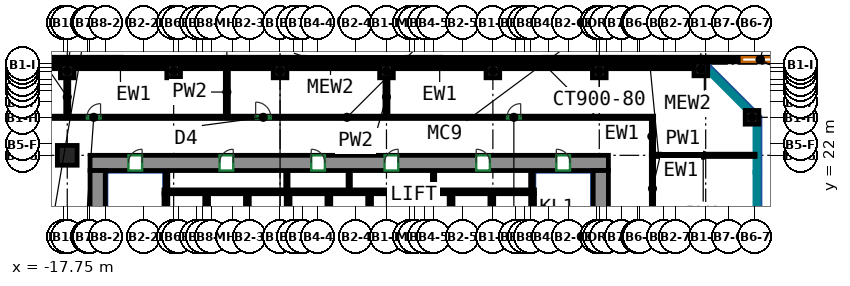
"""IFC4 building model, lengths in metres.
Left out: names, types, materials, properties, quantities, classifications, styles, units other than length and angle.
Written with IfcOpenShell. Run it as: python <this file> out.ifc"""

import sys

from ifc_helpers import new_model, si_unit, direction, frame, frame_2d, origin, origin_2d, place, context, subcontext, project, spatial, rectangle, extrude, source, transform, mapped, element, fill, save


model = new_model("IFC4")
c1 = context("Model", 3, precision=1e-05, world=origin(), true_north=direction((0.0, 1.0)))
c2 = subcontext(c1, "Body", "Model", "MODEL_VIEW")
j1 = project(units=[si_unit("LENGTHUNIT", "METRE"), si_unit("PLANEANGLEUNIT", "RADIAN")], contexts=[c1])
p1 = place(None, origin())
s1 = spatial("IfcSite", under=j1, at=p1, CompositionType="ELEMENT")
p2 = place(p1, origin())
s2 = spatial("IfcBuilding", under=s1, at=p2, CompositionType="ELEMENT")
p3 = place(p2, origin())
s3 = spatial("IfcBuildingStorey", under=s2, at=p3, CompositionType="ELEMENT", Elevation=0.0)
m1 = source(origin(), c2, "Body", "SweptSolid", [
    extrude(rectangle(XDim=1.3, YDim=1.3, at=origin_2d()), origin(), (0.0, 0.0, 1.0), 8.6),
])
p4 = place(p3, frame((-17.5, 22.0, 0.0), z_axis=(0.0, 0.0, 1.0), x_axis=(1.0, 0.0, 0.0)))
e1 = element("IfcColumn", 1, at=p4, inside=s3, PredefinedType="COLUMN", context=c2, shape_type="MappedRepresentation", body=[
    mapped(m1, transform((0.0, 0.0, 0.0))),
])
m2 = source(origin(), c2, "Body", "SweptSolid", [
    extrude(rectangle(XDim=0.9, YDim=0.9, at=origin_2d()), origin(), (0.0, 0.0, 1.0), 8.6),
])
for number, where, z_axis, x_axis in (
    (2, (-17.5, 27.55, 0.0), (0.0, 0.0, 1.0), (1.0, 0.0, 0.0)),
    (3, (-10.5, 27.55, 0.0), (0.0, 0.0, 1.0), (1.0, 0.0, 0.0)),
    (4, (-3.5, 27.55, 0.0), (0.0, 0.0, 1.0), (1.0, 0.0, 0.0)),
    (5, (3.5, 27.55, 0.0), (0.0, 0.0, 1.0), (1.0, 0.0, 0.0)),
    (6, (10.5, 27.55, 0.0), (0.0, 0.0, 1.0), (1.0, 0.0, 0.0)),
    (7, (17.5, 27.55, 0.0), (0.0, 0.0, 1.0), (1.0, 0.0, 0.0)),
    (8, (24.182, 27.682, 0.0), (0.0, 0.0, 1.0), (1.0, 0.0, 0.0)),
    (9, (27.55, 24.5, 0.0), (0.0, 0.0, 1.0), (1.0, 0.0, 0.0)),
):
    element("IfcColumn", number, at=place(p3, frame(where, z_axis=z_axis, x_axis=x_axis)), inside=s3, PredefinedType="COLUMN", context=c2, shape_type="MappedRepresentation", body=[
        mapped(m2, transform((0.0, 0.0, 0.0))),
    ])
m3 = source(origin(), c2, "Body", "SweptSolid", [
    extrude(rectangle(XDim=34.1, YDim=1.0, at=frame_2d((17.05, 0.0))), origin(), (0.0, 0.0, 1.0), 8.6),
])
p5 = place(p3, frame((-16.0, 21.5, 0.0), z_axis=(0.0, 0.0, 1.0), x_axis=(1.0, 0.0, 0.0)))
e10 = element("IfcWall", 10, at=p5, inside=s3, PredefinedType="SHEAR", context=c2, shape_type="MappedRepresentation", body=[
    mapped(m3, transform((0.0, 0.0, 0.0))),
])
p6 = place(p5, frame((8.52, 0.0, 0.0)))
e11 = element("IfcOpeningElement", 11, at=p6, cuts=e10, PredefinedType="OPENING", context=c2, shape_type="SweptSolid", body=[
    extrude(rectangle(XDim=0.9, YDim=2.1, at=frame_2d((0.45, 1.05))), frame((0.0, 0.51, 0.0), z_axis=(0.0, -1.0, 0.0), x_axis=(1.0, 0.0, 0.0)), (0.0, 0.0, 1.0), 1.02),
])
p7 = place(p5, frame((14.55, 0.0, 0.0)))
e12 = element("IfcOpeningElement", 12, at=p7, cuts=e10, PredefinedType="OPENING", context=c2, shape_type="SweptSolid", body=[
    extrude(rectangle(XDim=0.9, YDim=2.1, at=frame_2d((0.45, 1.05))), frame((0.0, 0.51, 0.0), z_axis=(0.0, -1.0, 0.0), x_axis=(1.0, 0.0, 0.0)), (0.0, 0.0, 1.0), 1.02),
])
p8 = place(p5, frame((19.374, 0.0, 0.0)))
e13 = element("IfcOpeningElement", 13, at=p8, cuts=e10, PredefinedType="OPENING", context=c2, shape_type="SweptSolid", body=[
    extrude(rectangle(XDim=0.9, YDim=2.1, at=frame_2d((0.45, 1.05))), frame((0.0, 0.51, 0.0), z_axis=(0.0, -1.0, 0.0), x_axis=(1.0, 0.0, 0.0)), (0.0, 0.0, 1.0), 1.02),
])
p9 = place(p5, frame((25.404, 0.0, 0.0)))
e14 = element("IfcOpeningElement", 14, at=p9, cuts=e10, PredefinedType="OPENING", context=c2, shape_type="SweptSolid", body=[
    extrude(rectangle(XDim=0.9, YDim=2.1, at=frame_2d((0.45, 1.05))), frame((0.0, 0.51, 0.0), z_axis=(0.0, -1.0, 0.0), x_axis=(1.0, 0.0, 0.0)), (0.0, 0.0, 1.0), 1.02),
])
p10 = place(p5, frame((2.525, 0.0, 0.0)))
e15 = element("IfcOpeningElement", 15, at=p10, cuts=e10, PredefinedType="OPENING", context=c2, shape_type="SweptSolid", body=[
    extrude(rectangle(XDim=0.9, YDim=2.1, at=frame_2d((0.45, 1.05))), frame((0.0, 0.51, 0.0), z_axis=(0.0, -1.0, 0.0), x_axis=(1.0, 0.0, 0.0)), (0.0, 0.0, 1.0), 1.02),
])
p11 = place(p5, frame((30.675, 0.0, 0.0)))
e16 = element("IfcOpeningElement", 16, at=p11, cuts=e10, PredefinedType="OPENING", context=c2, shape_type="SweptSolid", body=[
    extrude(rectangle(XDim=0.9, YDim=2.1, at=frame_2d((0.45, 1.05))), frame((0.0, 0.51, 0.0), z_axis=(0.0, -1.0, 0.0), x_axis=(1.0, 0.0, 0.0)), (0.0, 0.0, 1.0), 1.02),
])
m4 = source(origin(), c2, "Body", "SweptSolid", [
    extrude(rectangle(XDim=12.0, YDim=1.0, at=frame_2d((6.0, 0.0))), origin(), (0.0, 0.0, 1.0), 8.6),
])
for number, where, z_axis, x_axis in (
    (17, (-15.5, 9.0, 0.0), (0.0, 0.0, 1.0), (0.0, 1.0, 0.0)),
    (18, (17.6, 9.0, 0.0), (0.0, 0.0, 1.0), (0.0, 1.0, 0.0)),
):
    element("IfcWall", number, at=place(p3, frame(where, z_axis=z_axis, x_axis=x_axis)), inside=s3, PredefinedType="SHEAR", context=c2, shape_type="MappedRepresentation", body=[
        mapped(m4, transform((0.0, 0.0, 0.0))),
    ])
m5 = source(origin(), c2, "Body", "SweptSolid", [
    extrude(rectangle(XDim=5.782, YDim=0.3, at=frame_2d((2.891, 0.0))), origin(), (0.0, 0.0, 1.0), 8.6),
])
p12 = place(p3, frame((23.732, 27.85, 0.0), z_axis=(0.0, 0.0, 1.0), x_axis=(-1.0, 0.0, 0.0)))
e19 = element("IfcWall", 19, at=p12, inside=s3, PredefinedType="SOLIDWALL", context=c2, shape_type="MappedRepresentation", body=[
    mapped(m5, transform((0.0, 0.0, 0.0))),
])
m6 = source(origin(), c2, "Body", "SweptSolid", [
    extrude(rectangle(XDim=6.1, YDim=0.3, at=frame_2d((3.05, 0.0))), origin(), (0.0, 0.0, 1.0), 8.6),
])
for number, where, z_axis, x_axis in (
    (20, (17.05, 27.85, 0.0), (0.0, 0.0, 1.0), (-1.0, 0.0, 0.0)),
    (21, (10.05, 27.85, 0.0), (0.0, 0.0, 1.0), (-1.0, 0.0, 0.0)),
    (22, (3.05, 27.85, 0.0), (0.0, 0.0, 1.0), (-1.0, 0.0, 0.0)),
    (23, (-3.95, 27.85, 0.0), (0.0, 0.0, 1.0), (-1.0, 0.0, 0.0)),
    (24, (-10.95, 27.85, 0.0), (0.0, 0.0, 1.0), (-1.0, 0.0, 0.0)),
    (25, (-17.95, 27.85, 0.0), (0.0, 0.0, 1.0), (-1.0, 0.0, 0.0)),
):
    element("IfcWall", number, at=place(p3, frame(where, z_axis=z_axis, x_axis=x_axis)), inside=s3, PredefinedType="SOLIDWALL", context=c2, shape_type="MappedRepresentation", body=[
        mapped(m6, transform((0.0, 0.0, 0.0))),
    ])
m7 = source(origin(), c2, "Body", "SweptSolid", [
    extrude(rectangle(XDim=30.926, YDim=0.3, at=frame_2d((15.463, 0.0))), origin(), (0.0, 0.0, 1.0), 8.6),
])
p13 = place(p3, frame((55.55, 28.3, 0.0), z_axis=(0.0, 0.0, 1.0), x_axis=(-1.0, 0.0, 0.0)))
e26 = element("IfcWall", 26, at=p13, inside=s3, PredefinedType="SOLIDWALL", context=c2, shape_type="MappedRepresentation", body=[
    mapped(m7, transform((0.0, 0.0, 0.0))),
])
p14 = place(p13, frame((18.8, 0.0, 0.0)))
e27 = element("IfcOpeningElement", 27, at=p14, cuts=e26, PredefinedType="OPENING", context=c2, shape_type="SweptSolid", body=[
    extrude(rectangle(XDim=1.5, YDim=2.4, at=frame_2d((0.75, 1.2))), frame((0.0, 0.16, 0.0), z_axis=(0.0, -1.0, 0.0), x_axis=(1.0, 0.0, 0.0)), (0.0, 0.0, 1.0), 0.32),
])
p15 = place(p13, frame((4.8, 0.0, 0.0)))
e28 = element("IfcOpeningElement", 28, at=p15, cuts=e26, PredefinedType="OPENING", context=c2, shape_type="SweptSolid", body=[
    extrude(rectangle(XDim=1.5, YDim=2.4, at=frame_2d((0.75, 1.2))), frame((0.0, 0.16, 0.0), z_axis=(0.0, -1.0, 0.0), x_axis=(1.0, 0.0, 0.0)), (0.0, 0.0, 1.0), 0.32),
])
p16 = place(p13, frame((11.8, 0.0, 0.0)))
e29 = element("IfcOpeningElement", 29, at=p16, cuts=e26, PredefinedType="OPENING", context=c2, shape_type="SweptSolid", body=[
    extrude(rectangle(XDim=1.5, YDim=2.4, at=frame_2d((0.75, 1.2))), frame((0.0, 0.16, 0.0), z_axis=(0.0, -1.0, 0.0), x_axis=(1.0, 0.0, 0.0)), (0.0, 0.0, 1.0), 0.32),
])
p17 = place(p13, frame((14.263, 0.0, 0.6)))
e30 = element("IfcOpeningElement", 30, at=p17, cuts=e26, PredefinedType="OPENING", context=c2, shape_type="SweptSolid", body=[
    extrude(rectangle(XDim=2.4, YDim=3.0, at=frame_2d((1.2, 1.5))), frame((0.0, 0.16, 0.0), z_axis=(0.0, -1.0, 0.0), x_axis=(1.0, 0.0, 0.0)), (0.0, 0.0, 1.0), 0.32),
])
p18 = place(p13, frame((14.263, 0.0, 5.0)))
e31 = element("IfcOpeningElement", 31, at=p18, cuts=e26, PredefinedType="OPENING", context=c2, shape_type="SweptSolid", body=[
    extrude(rectangle(XDim=2.4, YDim=2.0, at=frame_2d((1.2, 1.0))), frame((0.0, 0.16, 0.0), z_axis=(0.0, -1.0, 0.0), x_axis=(1.0, 0.0, 0.0)), (0.0, 0.0, 1.0), 0.32),
])
p19 = place(p13, frame((22.263, 0.0, 0.6)))
e32 = element("IfcOpeningElement", 32, at=p19, cuts=e26, PredefinedType="OPENING", context=c2, shape_type="SweptSolid", body=[
    extrude(rectangle(XDim=2.4, YDim=3.0, at=frame_2d((1.2, 1.5))), frame((0.0, 0.16, 0.0), z_axis=(0.0, -1.0, 0.0), x_axis=(1.0, 0.0, 0.0)), (0.0, 0.0, 1.0), 0.32),
])
p20 = place(p13, frame((22.263, 0.0, 5.0)))
e33 = element("IfcOpeningElement", 33, at=p20, cuts=e26, PredefinedType="OPENING", context=c2, shape_type="SweptSolid", body=[
    extrude(rectangle(XDim=2.4, YDim=2.0, at=frame_2d((1.2, 1.0))), frame((0.0, 0.16, 0.0), z_axis=(0.0, -1.0, 0.0), x_axis=(1.0, 0.0, 0.0)), (0.0, 0.0, 1.0), 0.32),
])
p21 = place(p13, frame((26.263, 0.0, 0.6)))
e34 = element("IfcOpeningElement", 34, at=p21, cuts=e26, PredefinedType="OPENING", context=c2, shape_type="SweptSolid", body=[
    extrude(rectangle(XDim=2.4, YDim=3.0, at=frame_2d((1.2, 1.5))), frame((0.0, 0.16, 0.0), z_axis=(0.0, -1.0, 0.0), x_axis=(1.0, 0.0, 0.0)), (0.0, 0.0, 1.0), 0.32),
])
p22 = place(p13, frame((26.263, 0.0, 5.0)))
e35 = element("IfcOpeningElement", 35, at=p22, cuts=e26, PredefinedType="OPENING", context=c2, shape_type="SweptSolid", body=[
    extrude(rectangle(XDim=2.4, YDim=2.0, at=frame_2d((1.2, 1.0))), frame((0.0, 0.16, 0.0), z_axis=(0.0, -1.0, 0.0), x_axis=(1.0, 0.0, 0.0)), (0.0, 0.0, 1.0), 0.32),
])
m8 = source(origin(), c2, "Body", "SweptSolid", [
    extrude(rectangle(XDim=0.424, YDim=0.3, at=frame_2d((0.212, 0.0))), origin(), (0.0, 0.0, 1.0), 8.6),
])
p23 = place(p3, frame((24.624, 28.3, 0.0), z_axis=(0.0, 0.0, 1.0), x_axis=(-1.0, 0.0, 0.0)))
e36 = element("IfcWall", 36, at=p23, inside=s3, PredefinedType="SOLIDWALL", context=c2, shape_type="MappedRepresentation", body=[
    mapped(m8, transform((0.0, 0.0, 0.0))),
])
m9 = source(origin(), c2, "Body", "SweptSolid", [
    extrude(rectangle(XDim=48.762, YDim=0.3, at=frame_2d((24.381, 0.0))), origin(), (0.0, 0.0, 1.0), 8.6),
])
p24 = place(p3, frame((24.2, 28.3, 0.0), z_axis=(0.0, 0.0, 1.0), x_axis=(-1.0, 0.0, 0.0)))
e37 = element("IfcWall", 37, at=p24, inside=s3, PredefinedType="SOLIDWALL", context=c2, shape_type="MappedRepresentation", body=[
    mapped(m9, transform((0.0, 0.0, 0.0))),
])
m10 = source(origin(), c2, "Body", "SweptSolid", [
    extrude(rectangle(XDim=24.37, YDim=0.25, at=frame_2d((12.185, 0.0))), origin(), (0.0, 0.0, 1.0), 8.6),
])
p25 = place(p3, frame((-11.135, 19.6, 0.0), z_axis=(0.0, 0.0, 1.0), x_axis=(1.0, 0.0, 0.0)))
e38 = element("IfcWall", 38, at=p25, inside=s3, PredefinedType="PARTITIONING", context=c2, shape_type="MappedRepresentation", body=[
    mapped(m10, transform((0.0, 0.0, 0.0))),
])
m11 = source(origin(), c2, "Body", "SweptSolid", [
    extrude(rectangle(XDim=3.275, YDim=0.165, at=frame_2d((1.638, 0.0))), origin(), (0.0, 0.0, 1.0), 8.6),
])
p26 = place(p3, frame((13.067, 16.2, 0.0), z_axis=(0.0, 0.0, 1.0), x_axis=(0.0, 1.0, 0.0)))
e39 = element("IfcWall", 39, at=p26, inside=s3, PredefinedType="PARTITIONING", context=c2, shape_type="MappedRepresentation", body=[
    mapped(m11, transform((0.0, 0.0, 0.0))),
])
m12 = source(origin(), c2, "Body", "SweptSolid", [
    extrude(rectangle(XDim=1.275, YDim=0.165, at=frame_2d((0.637, 0.0))), origin(), (0.0, 0.0, 1.0), 8.6),
])
p27 = place(p3, frame((13.067, 19.725, 0.0), z_axis=(0.0, 0.0, 1.0), x_axis=(0.0, 1.0, 0.0)))
e40 = element("IfcWall", 40, at=p27, inside=s3, PredefinedType="PARTITIONING", context=c2, shape_type="MappedRepresentation", body=[
    mapped(m12, transform((0.0, 0.0, 0.0))),
])
p28 = place(p3, frame((-10.968, 16.2, 0.0), z_axis=(0.0, 0.0, 1.0), x_axis=(0.0, 1.0, 0.0)))
e41 = element("IfcWall", 41, at=p28, inside=s3, PredefinedType="PARTITIONING", context=c2, shape_type="MappedRepresentation", body=[
    mapped(m11, transform((0.0, 0.0, 0.0))),
])
p29 = place(p3, frame((-10.968, 19.725, 0.0), z_axis=(0.0, 0.0, 1.0), x_axis=(0.0, 1.0, 0.0)))
e42 = element("IfcWall", 42, at=p29, inside=s3, PredefinedType="PARTITIONING", context=c2, shape_type="MappedRepresentation", body=[
    mapped(m12, transform((0.0, 0.0, 0.0))),
])
m13 = source(origin(), c2, "Body", "SweptSolid", [
    extrude(rectangle(XDim=3.275, YDim=0.25, at=frame_2d((1.638, 0.0))), origin(), (0.0, 0.0, 1.0), 8.6),
])
p30 = place(p3, frame((10.43, 16.2, 0.0), z_axis=(0.0, 0.0, 1.0), x_axis=(0.0, 1.0, 0.0)))
e43 = element("IfcWall", 43, at=p30, inside=s3, PredefinedType="PARTITIONING", context=c2, shape_type="MappedRepresentation", body=[
    mapped(m13, transform((0.0, 0.0, 0.0))),
])
m14 = source(origin(), c2, "Body", "SweptSolid", [
    extrude(rectangle(XDim=2.725, YDim=0.085, at=frame_2d((1.363, 0.0))), origin(), (0.0, 0.0, 1.0), 8.6),
])
p31 = place(p3, frame((13.192, 16.75, 0.0), z_axis=(0.0, 0.0, 1.0), x_axis=(0.0, 1.0, 0.0)))
e44 = element("IfcWall", 44, at=p31, inside=s3, PredefinedType="PARTITIONING", context=c2, shape_type="MappedRepresentation", body=[
    mapped(m14, transform((0.0, 0.0, 0.0))),
])
for number, where, z_axis, x_axis in (
    (45, (2.39, 16.2, 0.0), (0.0, 0.0, 1.0), (0.0, 1.0, 0.0)),
    (46, (5.07, 16.2, 0.0), (0.0, 0.0, 1.0), (0.0, 1.0, 0.0)),
    (47, (7.75, 16.2, 0.0), (0.0, 0.0, 1.0), (0.0, 1.0, 0.0)),
    (48, (-0.29, 16.2, 0.0), (0.0, 0.0, 1.0), (0.0, 1.0, 0.0)),
):
    element("IfcWall", number, at=place(p3, frame(where, z_axis=z_axis, x_axis=x_axis)), inside=s3, PredefinedType="PARTITIONING", context=c2, shape_type="MappedRepresentation", body=[
        mapped(m13, transform((0.0, 0.0, 0.0))),
    ])
p32 = place(p3, frame((-11.093, 16.75, 0.0), z_axis=(0.0, 0.0, 1.0), x_axis=(0.0, 1.0, 0.0)))
e49 = element("IfcWall", 49, at=p32, inside=s3, PredefinedType="PARTITIONING", context=c2, shape_type="MappedRepresentation", body=[
    mapped(m14, transform((0.0, 0.0, 0.0))),
])
for number, where, z_axis, x_axis in (
    (50, (-2.97, 16.2, 0.0), (0.0, 0.0, 1.0), (0.0, 1.0, 0.0)),
    (51, (-5.65, 16.2, 0.0), (0.0, 0.0, 1.0), (0.0, 1.0, 0.0)),
    (52, (-8.33, 16.2, 0.0), (0.0, 0.0, 1.0), (0.0, 1.0, 0.0)),
):
    element("IfcWall", number, at=place(p3, frame(where, z_axis=z_axis, x_axis=x_axis)), inside=s3, PredefinedType="PARTITIONING", context=c2, shape_type="MappedRepresentation", body=[
        mapped(m13, transform((0.0, 0.0, 0.0))),
    ])
m15 = source(origin(), c2, "Body", "SweptSolid", [
    extrude(rectangle(XDim=1.275, YDim=0.15, at=frame_2d((0.637, 0.0))), origin(), (0.0, 0.0, 1.0), 8.6),
])
for number, where, z_axis, x_axis in (
    (53, (-3.05, 19.725, 0.0), (0.0, 0.0, 1.0), (0.0, 1.0, 0.0)),
    (54, (1.05, 19.725, 0.0), (0.0, 0.0, 1.0), (0.0, 1.0, 0.0)),
    (55, (6.598, 19.725, 0.0), (0.0, 0.0, 1.0), (0.0, 1.0, 0.0)),
):
    element("IfcWall", number, at=place(p3, frame(where, z_axis=z_axis, x_axis=x_axis)), inside=s3, PredefinedType="PARTITIONING", context=c2, shape_type="MappedRepresentation", body=[
        mapped(m15, transform((0.0, 0.0, 0.0))),
    ])
p33 = place(p3, frame((21.0, 17.7, 0.0), z_axis=(0.0, 0.0, 1.0), x_axis=(0.0, 1.0, 0.0)))
e56 = element("IfcWall", 56, at=p33, inside=s3, PredefinedType="PARTITIONING", context=c2, shape_type="SweptSolid", body=[
    extrude(rectangle(XDim=4.225, YDim=0.15, at=frame_2d((2.113, 0.0))), origin(), (0.0, 0.0, 1.0), 8.6),
])
p34 = place(p3, frame((27.75, 22.0, 0.0), z_axis=(0.0, 0.0, 1.0), x_axis=(-1.0, 0.0, 0.0)))
e57 = element("IfcWall", 57, at=p34, inside=s3, PredefinedType="PARTITIONING", context=c2, shape_type="SweptSolid", body=[
    extrude(rectangle(XDim=6.825, YDim=0.15, at=frame_2d((3.413, 0.0))), origin(), (0.0, 0.0, 1.0), 8.6),
])
p35 = place(p3, frame((-19.275, 24.5, 0.0), z_axis=(0.0, 0.0, 1.0), x_axis=(1.0, 0.0, 0.0)))
e58 = element("IfcWall", 58, at=p35, inside=s3, PredefinedType="PARTITIONING", context=c2, shape_type="SweptSolid", body=[
    extrude(rectangle(XDim=40.35, YDim=0.15, at=frame_2d((20.175, 0.0))), origin(), (0.0, 0.0, 1.0), 7.95),
])
p36 = place(p35, frame((3.067, 0.0, 0.0)))
e59 = element("IfcOpeningElement", 59, at=p36, cuts=e58, PredefinedType="OPENING", context=c2, shape_type="SweptSolid", body=[
    extrude(rectangle(XDim=0.9, YDim=2.1, at=frame_2d((0.45, 1.05))), frame((0.0, 0.085, 0.0), z_axis=(0.0, -1.0, 0.0), x_axis=(1.0, 0.0, 0.0)), (0.0, 0.0, 1.0), 0.17),
])
p37 = place(p35, frame((14.169, 0.0, 0.0)))
e60 = element("IfcOpeningElement", 60, at=p37, cuts=e58, PredefinedType="OPENING", context=c2, shape_type="SweptSolid", body=[
    extrude(rectangle(XDim=1.0, YDim=2.1, at=frame_2d((0.5, 1.05))), frame((0.0, 0.085, 0.0), z_axis=(0.0, -1.0, 0.0), x_axis=(1.0, 0.0, 0.0)), (0.0, 0.0, 1.0), 0.17),
])
p38 = place(p35, frame((30.705, 0.0, 0.0)))
e61 = element("IfcOpeningElement", 61, at=p38, cuts=e58, PredefinedType="OPENING", context=c2, shape_type="SweptSolid", body=[
    extrude(rectangle(XDim=0.9, YDim=2.1, at=frame_2d((0.45, 1.05))), frame((0.0, 0.085, 0.0), z_axis=(0.0, -1.0, 0.0), x_axis=(1.0, 0.0, 0.0)), (0.0, 0.0, 1.0), 0.17),
])
p39 = place(p3, frame((21.0, 22.066, 0.0), z_axis=(0.0, 0.0, 1.0), x_axis=(0.0, 1.0, 0.0)))
e62 = element("IfcWall", 62, at=p39, inside=s3, PredefinedType="PARTITIONING", context=c2, shape_type="SweptSolid", body=[
    extrude(rectangle(XDim=2.359, YDim=0.15, at=frame_2d((1.18, 0.0))), origin(), (0.0, 0.0, 1.0), 8.6),
])
p40 = place(p3, frame((-17.5, 24.576, 0.0), z_axis=(0.0, 0.0, 1.0), x_axis=(0.0, 1.0, 0.0)))
e63 = element("IfcWall", 63, at=p40, inside=s3, PredefinedType="PARTITIONING", context=c2, shape_type="SweptSolid", body=[
    extrude(rectangle(XDim=2.524, YDim=0.2, at=frame_2d((1.262, 0.0))), origin(), (0.0, 0.0, 1.0), 7.95),
])
p41 = place(p3, frame((-7.0, 24.576, 0.0), z_axis=(0.0, 0.0, 1.0), x_axis=(0.0, 1.0, 0.0)))
e64 = element("IfcWall", 64, at=p41, inside=s3, PredefinedType="PARTITIONING", context=c2, shape_type="SweptSolid", body=[
    extrude(rectangle(XDim=3.174, YDim=0.2, at=frame_2d((1.587, 0.0))), origin(), (0.0, 0.0, 1.0), 8.6),
])
p42 = place(p3, frame((3.5, 24.576, 0.0), z_axis=(0.0, 0.0, 1.0), x_axis=(0.0, 1.0, 0.0)))
e65 = element("IfcWall", 65, at=p42, inside=s3, PredefinedType="PARTITIONING", context=c2, shape_type="SweptSolid", body=[
    extrude(rectangle(XDim=2.524, YDim=0.2, at=frame_2d((1.262, 0.0))), origin(), (0.0, 0.0, 1.0), 8.6),
])
p43 = place(p21, origin())
e66 = element("IfcWindow", 66, at=p43, inside=s3, PartitioningType="SINGLE_PANEL", PredefinedType="WINDOW", context=c2, shape_type="SweptSolid", body=[
    extrude(rectangle(XDim=2.4, YDim=3.0, at=frame_2d((1.2, 1.5))), frame((0.0, 0.03, 0.0), z_axis=(0.0, -1.0, 0.0), x_axis=(1.0, 0.0, 0.0)), (0.0, 0.0, 1.0), 0.06),
])
fill(e34, e66)
p44 = place(p22, origin())
e67 = element("IfcWindow", 67, at=p44, inside=s3, PartitioningType="SINGLE_PANEL", PredefinedType="WINDOW", context=c2, shape_type="SweptSolid", body=[
    extrude(rectangle(XDim=2.4, YDim=2.0, at=frame_2d((1.2, 1.0))), frame((0.0, 0.03, 0.0), z_axis=(0.0, -1.0, 0.0), x_axis=(1.0, 0.0, 0.0)), (0.0, 0.0, 1.0), 0.06),
])
fill(e35, e67)
p45 = place(p6, origin())
e68 = element("IfcDoor", 68, at=p45, inside=s3, OperationType="SINGLE_SWING_RIGHT", PredefinedType="DOOR", context=c2, shape_type="SweptSolid", body=[
    extrude(rectangle(XDim=0.9, YDim=2.1, at=frame_2d((0.45, 1.05))), frame((0.0, -0.355, 0.0), z_axis=(0.0, -1.0, 0.0), x_axis=(1.0, 0.0, 0.0)), (0.0, 0.0, 1.0), 0.05),
])
fill(e11, e68)
p46 = place(p7, origin())
e69 = element("IfcDoor", 69, at=p46, inside=s3, OperationType="SINGLE_SWING_LEFT", PredefinedType="DOOR", context=c2, shape_type="SweptSolid", body=[
    extrude(rectangle(XDim=0.9, YDim=2.1, at=frame_2d((0.45, 1.05))), frame((0.0, -0.355, 0.0), z_axis=(0.0, -1.0, 0.0), x_axis=(1.0, 0.0, 0.0)), (0.0, 0.0, 1.0), 0.05),
])
fill(e12, e69)
p47 = place(p8, origin())
e70 = element("IfcDoor", 70, at=p47, inside=s3, OperationType="SINGLE_SWING_RIGHT", PredefinedType="DOOR", context=c2, shape_type="SweptSolid", body=[
    extrude(rectangle(XDim=0.9, YDim=2.1, at=frame_2d((0.45, 1.05))), frame((0.0, -0.355, 0.0), z_axis=(0.0, -1.0, 0.0), x_axis=(1.0, 0.0, 0.0)), (0.0, 0.0, 1.0), 0.05),
])
fill(e13, e70)
p48 = place(p9, origin())
e71 = element("IfcDoor", 71, at=p48, inside=s3, OperationType="SINGLE_SWING_LEFT", PredefinedType="DOOR", context=c2, shape_type="SweptSolid", body=[
    extrude(rectangle(XDim=0.9, YDim=2.1, at=frame_2d((0.45, 1.05))), frame((0.0, -0.355, 0.0), z_axis=(0.0, -1.0, 0.0), x_axis=(1.0, 0.0, 0.0)), (0.0, 0.0, 1.0), 0.05),
])
fill(e14, e71)
p49 = place(p10, origin())
e72 = element("IfcDoor", 72, at=p49, inside=s3, OperationType="SINGLE_SWING_RIGHT", PredefinedType="DOOR", context=c2, shape_type="SweptSolid", body=[
    extrude(rectangle(XDim=0.9, YDim=2.1, at=frame_2d((0.45, 1.05))), frame((0.0, -0.355, 0.0), z_axis=(0.0, -1.0, 0.0), x_axis=(1.0, 0.0, 0.0)), (0.0, 0.0, 1.0), 0.05),
])
fill(e15, e72)
p50 = place(p11, origin())
e73 = element("IfcDoor", 73, at=p50, inside=s3, OperationType="SINGLE_SWING_LEFT", PredefinedType="DOOR", context=c2, shape_type="SweptSolid", body=[
    extrude(rectangle(XDim=0.9, YDim=2.1, at=frame_2d((0.45, 1.05))), frame((0.0, -0.355, 0.0), z_axis=(0.0, -1.0, 0.0), x_axis=(1.0, 0.0, 0.0)), (0.0, 0.0, 1.0), 0.05),
])
fill(e16, e73)
p51 = place(p36, origin())
e74 = element("IfcDoor", 74, at=p51, inside=s3, OperationType="SINGLE_SWING_RIGHT", PredefinedType="DOOR", context=c2, shape_type="SweptSolid", body=[
    extrude(rectangle(XDim=0.9, YDim=2.1, at=frame_2d((0.45, 1.05))), frame((0.0, 0.025, 0.0), z_axis=(0.0, -1.0, 0.0), x_axis=(1.0, 0.0, 0.0)), (0.0, 0.0, 1.0), 0.05),
])
fill(e59, e74)
p52 = place(p37, origin())
e75 = element("IfcDoor", 75, at=p52, inside=s3, OperationType="SINGLE_SWING_LEFT", PredefinedType="DOOR", context=c2, shape_type="SweptSolid", body=[
    extrude(rectangle(XDim=1.0, YDim=2.1, at=frame_2d((0.5, 1.05))), frame((0.0, 0.025, 0.0), z_axis=(0.0, -1.0, 0.0), x_axis=(1.0, 0.0, 0.0)), (0.0, 0.0, 1.0), 0.05),
])
fill(e60, e75)
p53 = place(p38, origin())
e76 = element("IfcDoor", 76, at=p53, inside=s3, OperationType="SINGLE_SWING_RIGHT", PredefinedType="DOOR", context=c2, shape_type="SweptSolid", body=[
    extrude(rectangle(XDim=0.9, YDim=2.1, at=frame_2d((0.45, 1.05))), frame((0.0, 0.025, 0.0), z_axis=(0.0, -1.0, 0.0), x_axis=(1.0, 0.0, 0.0)), (0.0, 0.0, 1.0), 0.05),
])
fill(e61, e76)
save(model, sys.argv[1])
